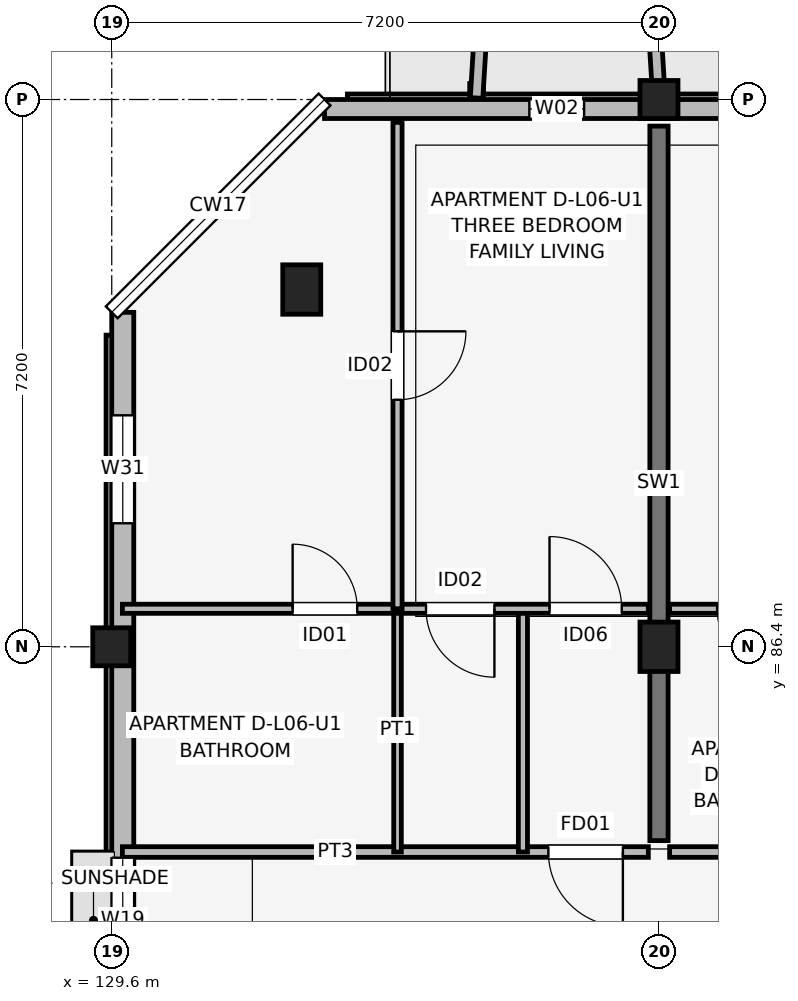
"""IFC4 building model, lengths in metres.
Left out: names, types, materials, properties, quantities, classifications, styles, units other than length and angle.
Written with IfcOpenShell. Run it as: python <this file> out.ifc"""

import sys

from ifc_helpers import new_model, si_unit, direction, frame, frame_2d, origin, origin_2d, place, context, subcontext, project, spatial, rectangle, extrude, element, fill, save


model = new_model("IFC4")
c1 = context("Model", 3, precision=1e-05, world=origin(), true_north=direction((0.0, 1.0)))
c2 = subcontext(c1, "Body", "Model", "MODEL_VIEW")
j1 = project(units=[si_unit("LENGTHUNIT", "METRE"), si_unit("PLANEANGLEUNIT", "RADIAN")], contexts=[c1])
p1 = place(None, origin())
s1 = spatial("IfcSite", under=j1, at=p1, CompositionType="ELEMENT")
p2 = place(p1, origin())
s2 = spatial("IfcBuilding", under=s1, at=p2, CompositionType="ELEMENT")
p3 = place(p2, frame((0.0, 0.0, 21.3)))
s3 = spatial("IfcBuildingStorey", under=s2, at=p3, CompositionType="ELEMENT", Elevation=21.3)
p4 = place(p3, frame((129.6, 86.4, 0.0), z_axis=(0.0, 0.0, 1.0), x_axis=(1.0, 0.0, 0.0)))
e1 = element("IfcColumn", 1, at=p4, inside=s3, PredefinedType="COLUMN", context=c2, shape_type="SweptSolid", body=[
    extrude(rectangle(XDim=0.5, YDim=0.5, at=origin_2d()), origin(), (0.0, 0.0, 1.0), 3.15),
])
for number, where, z_axis, x_axis in (
    (2, (132.1, 91.1, 0.0), (0.0, 0.0, 1.0), (1.0, 0.0, 0.0)),
    (3, (136.8, 86.4, 0.0), (0.0, 0.0, 1.0), (1.0, 0.0, 0.0)),
):
    element("IfcColumn", number, at=place(p3, frame(where, z_axis=z_axis, x_axis=x_axis)), inside=s3, PredefinedType="COLUMN", context=c2, shape_type="SweptSolid", body=[
        extrude(rectangle(XDim=0.5, YDim=0.65, at=origin_2d()), origin(), (0.0, 0.0, 1.0), 3.15),
    ])
p5 = place(p3, frame((136.8, 93.6, 0.0), z_axis=(0.0, 0.0, 1.0), x_axis=(1.0, 0.0, 0.0)))
e4 = element("IfcColumn", 4, at=p5, inside=s3, PredefinedType="COLUMN", context=c2, shape_type="SweptSolid", body=[
    extrude(rectangle(XDim=0.5, YDim=0.5, at=origin_2d()), origin(), (0.0, 0.0, 1.0), 3.15),
])
p6 = place(p3, frame((136.8, 83.85, 0.0), z_axis=(0.0, 0.0, 1.0), x_axis=(0.0, 1.0, 0.0)))
e5 = element("IfcWall", 5, at=p6, inside=s3, PredefinedType="SHEAR", context=c2, shape_type="SweptSolid", body=[
    extrude(rectangle(XDim=9.4, YDim=0.24, at=frame_2d((4.7, 0.0))), origin(), (0.0, 0.0, 1.0), 3.15),
])
p7 = place(p3, frame((162.8, 93.475, 0.0), z_axis=(0.0, 0.0, 1.0), x_axis=(-1.0, 0.0, 0.0)))
e6 = element("IfcWall", 6, at=p7, inside=s3, PredefinedType="SOLIDWALL", context=c2, shape_type="SweptSolid", body=[
    extrude(rectangle(XDim=30.4, YDim=0.25, at=frame_2d((15.2, 0.0))), origin(), (0.0, 0.0, 1.0), 2.43),
])
p8 = place(p7, frame((23.3, 0.0, 0.0), z_axis=(0.0, 0.0, 1.0), x_axis=(-1.0, 0.0, 0.0)))
e7 = element("IfcOpeningElement", 7, at=p8, cuts=e6, PredefinedType="OPENING", context=c2, shape_type="SweptSolid", body=[
    extrude(rectangle(XDim=1.8, YDim=2.15, at=frame_2d((0.9, 1.075))), frame((0.0, 0.135, 0.0), z_axis=(0.0, -1.0, 0.0), x_axis=(1.0, 0.0, 0.0)), (0.0, 0.0, 1.0), 0.27),
])
p9 = place(p7, frame((8.825, 0.0, 0.0), z_axis=(0.0, 0.0, 1.0), x_axis=(-1.0, 0.0, 0.0)))
e8 = element("IfcOpeningElement", 8, at=p9, cuts=e6, PredefinedType="OPENING", context=c2, shape_type="SweptSolid", body=[
    extrude(rectangle(XDim=1.65, YDim=2.15, at=frame_2d((0.825, 1.075))), frame((0.0, 0.135, 0.0), z_axis=(0.0, -1.0, 0.0), x_axis=(1.0, 0.0, 0.0)), (0.0, 0.0, 1.0), 0.27),
])
p10 = place(p7, frame((26.985, 0.0, 0.75)))
e9 = element("IfcOpeningElement", 9, at=p10, cuts=e6, PredefinedType="OPENING", context=c2, shape_type="SweptSolid", body=[
    extrude(rectangle(XDim=0.72, YDim=1.35, at=frame_2d((0.36, 0.675))), frame((0.0, 0.135, 0.0), z_axis=(0.0, -1.0, 0.0), x_axis=(1.0, 0.0, 0.0)), (0.0, 0.0, 1.0), 0.27),
])
p11 = place(p7, frame((17.115, 0.0, 0.75)))
e10 = element("IfcOpeningElement", 10, at=p11, cuts=e6, PredefinedType="OPENING", context=c2, shape_type="SweptSolid", body=[
    extrude(rectangle(XDim=0.85, YDim=1.4, at=frame_2d((0.425, 0.7))), frame((0.0, 0.135, 0.0), z_axis=(0.0, -1.0, 0.0), x_axis=(1.0, 0.0, 0.0)), (0.0, 0.0, 1.0), 0.27),
])
p12 = place(p7, frame((14.125, 0.0, 0.67)))
e11 = element("IfcOpeningElement", 11, at=p12, cuts=e6, PredefinedType="OPENING", context=c2, shape_type="SweptSolid", body=[
    extrude(rectangle(XDim=2.15, YDim=1.65, at=frame_2d((1.075, 0.825))), frame((0.0, 0.135, 0.0), z_axis=(0.0, -1.0, 0.0), x_axis=(1.0, 0.0, 0.0)), (0.0, 0.0, 1.0), 0.27),
])
p13 = place(p7, frame((2.125, 0.0, 0.7)))
e12 = element("IfcOpeningElement", 12, at=p13, cuts=e6, PredefinedType="OPENING", context=c2, shape_type="SweptSolid", body=[
    extrude(rectangle(XDim=1.86, YDim=1.6, at=frame_2d((0.93, 0.8))), frame((0.0, 0.135, 0.0), z_axis=(0.0, -1.0, 0.0), x_axis=(1.0, 0.0, 0.0)), (0.0, 0.0, 1.0), 0.27),
])
p14 = place(p3, frame((129.745, 90.8, 0.0), z_axis=(0.0, 0.0, 1.0), x_axis=(0.0, -1.0, 0.0)))
e13 = element("IfcWall", 13, at=p14, inside=s3, PredefinedType="SOLIDWALL", context=c2, shape_type="SweptSolid", body=[
    extrude(rectangle(XDim=16.0, YDim=0.29, at=frame_2d((8.0, 0.0))), origin(), (0.0, 0.0, 1.0), 2.43),
])
p15 = place(p14, frame((7.175, 0.0, 1.05)))
e14 = element("IfcOpeningElement", 14, at=p15, cuts=e13, PredefinedType="OPENING", context=c2, shape_type="SweptSolid", body=[
    extrude(rectangle(XDim=1.65, YDim=1.15, at=frame_2d((0.825, 0.575))), frame((0.0, 0.155, 0.0), z_axis=(0.0, -1.0, 0.0), x_axis=(1.0, 0.0, 0.0)), (0.0, 0.0, 1.0), 0.31),
])
p16 = place(p14, frame((1.355, 0.0, 0.72)))
e15 = element("IfcOpeningElement", 15, at=p16, cuts=e13, PredefinedType="OPENING", context=c2, shape_type="SweptSolid", body=[
    extrude(rectangle(XDim=1.42, YDim=1.6, at=frame_2d((0.71, 0.8))), frame((0.0, 0.155, 0.0), z_axis=(0.0, -1.0, 0.0), x_axis=(1.0, 0.0, 0.0)), (0.0, 0.0, 1.0), 0.31),
])
for number, where, z_axis, x_axis in (
    (16, (134.4, 93.62, 0.0), (0.0, 0.0, 1.0), (0.061, 0.998, 0.0)),
    (17, (136.8, 93.62, 0.0), (0.0, 0.0, 1.0), (-0.061, 0.998, 0.0)),
):
    element("IfcWall", number, at=place(p3, frame(where, z_axis=z_axis, x_axis=x_axis)), inside=s3, PredefinedType="ELEMENTEDWALL", context=c2, shape_type="SweptSolid", body=[
        extrude(rectangle(XDim=1.964, YDim=0.165, at=frame_2d((0.982, 0.0))), origin(), (0.0, 0.0, 1.0), 2.95),
    ])
p17 = place(p3, frame((129.74, 83.7, 0.0), z_axis=(0.0, 0.0, 1.0), x_axis=(1.0, 0.0, 0.0)))
e18 = element("IfcWall", 18, at=p17, inside=s3, PredefinedType="PARTITIONING", context=c2, shape_type="SweptSolid", body=[
    extrude(rectangle(XDim=6.92, YDim=0.14, at=frame_2d((3.46, 0.0))), origin(), (0.0, 0.0, 1.0), 2.38),
])
p18 = place(p17, frame((6.585, 0.0, 0.0), z_axis=(0.0, 0.0, 1.0), x_axis=(-1.0, 0.0, 0.0)))
e19 = element("IfcOpeningElement", 19, at=p18, cuts=e18, PredefinedType="OPENING", context=c2, shape_type="SweptSolid", body=[
    extrude(rectangle(XDim=0.98, YDim=2.1, at=frame_2d((0.49, 1.05))), frame((0.0, 0.08, 0.0), z_axis=(0.0, -1.0, 0.0), x_axis=(1.0, 0.0, 0.0)), (0.0, 0.0, 1.0), 0.16),
])
p19 = place(p3, frame((133.36, 83.7, 0.0), z_axis=(0.0, 0.0, 1.0), x_axis=(0.0, 1.0, 0.0)))
e20 = element("IfcWall", 20, at=p19, inside=s3, PredefinedType="PARTITIONING", context=c2, shape_type="SweptSolid", body=[
    extrude(rectangle(XDim=3.2, YDim=0.1, at=frame_2d((1.6, 0.0))), origin(), (0.0, 0.0, 1.0), 2.38),
])
p20 = place(p3, frame((135.01, 83.7, 0.0), z_axis=(0.0, 0.0, 1.0), x_axis=(0.0, 1.0, 0.0)))
e21 = element("IfcWall", 21, at=p20, inside=s3, PredefinedType="PARTITIONING", context=c2, shape_type="SweptSolid", body=[
    extrude(rectangle(XDim=3.2, YDim=0.12, at=frame_2d((1.6, 0.0))), origin(), (0.0, 0.0, 1.0), 2.38),
])
p21 = place(p3, frame((129.74, 86.9, 0.0), z_axis=(0.0, 0.0, 1.0), x_axis=(1.0, 0.0, 0.0)))
e22 = element("IfcWall", 22, at=p21, inside=s3, PredefinedType="PARTITIONING", context=c2, shape_type="SweptSolid", body=[
    extrude(rectangle(XDim=6.92, YDim=0.12, at=frame_2d((3.46, 0.0))), origin(), (0.0, 0.0, 1.0), 2.38),
])
p22 = place(p21, frame((2.24, 0.0, 0.0)))
e23 = element("IfcOpeningElement", 23, at=p22, cuts=e22, PredefinedType="OPENING", context=c2, shape_type="SweptSolid", body=[
    extrude(rectangle(XDim=0.85, YDim=2.08, at=frame_2d((0.425, 1.04))), frame((0.0, 0.07, 0.0), z_axis=(0.0, -1.0, 0.0), x_axis=(1.0, 0.0, 0.0)), (0.0, 0.0, 1.0), 0.14),
])
p23 = place(p21, frame((4.895, 0.0, 0.0), z_axis=(0.0, 0.0, 1.0), x_axis=(-1.0, 0.0, 0.0)))
e24 = element("IfcOpeningElement", 24, at=p23, cuts=e22, PredefinedType="OPENING", context=c2, shape_type="SweptSolid", body=[
    extrude(rectangle(XDim=0.9, YDim=2.08, at=frame_2d((0.45, 1.04))), frame((0.0, 0.07, 0.0), z_axis=(0.0, -1.0, 0.0), x_axis=(1.0, 0.0, 0.0)), (0.0, 0.0, 1.0), 0.14),
])
p24 = place(p21, frame((5.62, 0.0, 0.0)))
e25 = element("IfcOpeningElement", 25, at=p24, cuts=e22, PredefinedType="OPENING", context=c2, shape_type="SweptSolid", body=[
    extrude(rectangle(XDim=0.95, YDim=2.08, at=frame_2d((0.475, 1.04))), frame((0.0, 0.07, 0.0), z_axis=(0.0, -1.0, 0.0), x_axis=(1.0, 0.0, 0.0)), (0.0, 0.0, 1.0), 0.14),
])
p25 = place(p3, frame((133.36, 86.9, 0.0), z_axis=(0.0, 0.0, 1.0), x_axis=(0.0, 1.0, 0.0)))
e26 = element("IfcWall", 26, at=p25, inside=s3, PredefinedType="PARTITIONING", context=c2, shape_type="SweptSolid", body=[
    extrude(rectangle(XDim=6.4, YDim=0.12, at=frame_2d((3.2, 0.0))), origin(), (0.0, 0.0, 1.0), 2.38),
])
p26 = place(p25, frame((3.65, 0.0, 0.0), z_axis=(0.0, 0.0, 1.0), x_axis=(-1.0, 0.0, 0.0)))
e27 = element("IfcOpeningElement", 27, at=p26, cuts=e26, PredefinedType="OPENING", context=c2, shape_type="SweptSolid", body=[
    extrude(rectangle(XDim=0.9, YDim=2.08, at=frame_2d((0.45, 1.04))), frame((0.0, 0.07, 0.0), z_axis=(0.0, -1.0, 0.0), x_axis=(1.0, 0.0, 0.0)), (0.0, 0.0, 1.0), 0.14),
])
p27 = place(p3, frame((136.94, 83.7, 0.0), z_axis=(0.0, 0.0, 1.0), x_axis=(1.0, 0.0, 0.0)))
e28 = element("IfcWall", 28, at=p27, inside=s3, PredefinedType="PARTITIONING", context=c2, shape_type="SweptSolid", body=[
    extrude(rectangle(XDim=6.92, YDim=0.14, at=frame_2d((3.46, 0.0))), origin(), (0.0, 0.0, 1.0), 2.38),
])
p28 = place(p27, frame((4.995, 0.0, 0.0)))
e29 = element("IfcOpeningElement", 29, at=p28, cuts=e28, PredefinedType="OPENING", context=c2, shape_type="SweptSolid", body=[
    extrude(rectangle(XDim=0.98, YDim=2.1, at=frame_2d((0.49, 1.05))), frame((0.0, 0.08, 0.0), z_axis=(0.0, -1.0, 0.0), x_axis=(1.0, 0.0, 0.0)), (0.0, 0.0, 1.0), 0.16),
])
p29 = place(p3, frame((136.94, 86.9, 0.0), z_axis=(0.0, 0.0, 1.0), x_axis=(1.0, 0.0, 0.0)))
e30 = element("IfcWall", 30, at=p29, inside=s3, PredefinedType="PARTITIONING", context=c2, shape_type="SweptSolid", body=[
    extrude(rectangle(XDim=6.92, YDim=0.12, at=frame_2d((3.46, 0.0))), origin(), (0.0, 0.0, 1.0), 2.38),
])
p30 = place(p29, frame((1.475, 0.0, 0.0), z_axis=(0.0, 0.0, 1.0), x_axis=(-1.0, 0.0, 0.0)))
e31 = element("IfcOpeningElement", 31, at=p30, cuts=e30, PredefinedType="OPENING", context=c2, shape_type="SweptSolid", body=[
    extrude(rectangle(XDim=0.85, YDim=2.08, at=frame_2d((0.425, 1.04))), frame((0.0, 0.07, 0.0), z_axis=(0.0, -1.0, 0.0), x_axis=(1.0, 0.0, 0.0)), (0.0, 0.0, 1.0), 0.14),
])
p31 = place(p29, frame((2.625, 0.0, 0.0)))
e32 = element("IfcOpeningElement", 32, at=p31, cuts=e30, PredefinedType="OPENING", context=c2, shape_type="SweptSolid", body=[
    extrude(rectangle(XDim=0.9, YDim=2.08, at=frame_2d((0.45, 1.04))), frame((0.0, 0.07, 0.0), z_axis=(0.0, -1.0, 0.0), x_axis=(1.0, 0.0, 0.0)), (0.0, 0.0, 1.0), 0.14),
])
p32 = place(p29, frame((5.96, 0.0, 0.0), z_axis=(0.0, 0.0, 1.0), x_axis=(-1.0, 0.0, 0.0)))
e33 = element("IfcOpeningElement", 33, at=p32, cuts=e30, PredefinedType="OPENING", context=c2, shape_type="SweptSolid", body=[
    extrude(rectangle(XDim=0.95, YDim=2.08, at=frame_2d((0.475, 1.04))), frame((0.0, 0.07, 0.0), z_axis=(0.0, -1.0, 0.0), x_axis=(1.0, 0.0, 0.0)), (0.0, 0.0, 1.0), 0.14),
])
p33 = place(p10, origin())
e34 = element("IfcWindow", 34, at=p33, inside=s3, PartitioningType="SINGLE_PANEL", PredefinedType="WINDOW", context=c2, shape_type="SweptSolid", body=[
    extrude(rectangle(XDim=0.72, YDim=1.35, at=frame_2d((0.36, 0.675))), frame((0.0, 0.03, 0.0), z_axis=(0.0, -1.0, 0.0), x_axis=(1.0, 0.0, 0.0)), (0.0, 0.0, 1.0), 0.06),
])
fill(e9, e34)
p34 = place(p15, origin())
e35 = element("IfcWindow", 35, at=p34, inside=s3, PartitioningType="SINGLE_PANEL", PredefinedType="WINDOW", context=c2, shape_type="SweptSolid", body=[
    extrude(rectangle(XDim=1.65, YDim=1.15, at=frame_2d((0.825, 0.575))), frame((0.0, 0.03, 0.0), z_axis=(0.0, -1.0, 0.0), x_axis=(1.0, 0.0, 0.0)), (0.0, 0.0, 1.0), 0.06),
])
fill(e14, e35)
p35 = place(p16, origin())
e36 = element("IfcWindow", 36, at=p35, inside=s3, PartitioningType="SINGLE_PANEL", PredefinedType="WINDOW", context=c2, shape_type="SweptSolid", body=[
    extrude(rectangle(XDim=1.42, YDim=1.6, at=frame_2d((0.71, 0.8))), frame((0.0, 0.03, 0.0), z_axis=(0.0, -1.0, 0.0), x_axis=(1.0, 0.0, 0.0)), (0.0, 0.0, 1.0), 0.06),
])
fill(e15, e36)
p36 = place(p18, origin())
e37 = element("IfcDoor", 37, at=p36, inside=s3, OperationType="SINGLE_SWING_RIGHT", PredefinedType="DOOR", context=c2, shape_type="SweptSolid", body=[
    extrude(rectangle(XDim=0.98, YDim=2.1, at=frame_2d((0.49, 1.05))), frame((0.0, 0.025, 0.0), z_axis=(0.0, -1.0, 0.0), x_axis=(1.0, 0.0, 0.0)), (0.0, 0.0, 1.0), 0.05),
])
fill(e19, e37)
p37 = place(p22, origin())
e38 = element("IfcDoor", 38, at=p37, inside=s3, OperationType="SINGLE_SWING_LEFT", PredefinedType="DOOR", context=c2, shape_type="SweptSolid", body=[
    extrude(rectangle(XDim=0.85, YDim=2.08, at=frame_2d((0.425, 1.04))), frame((0.0, 0.025, 0.0), z_axis=(0.0, -1.0, 0.0), x_axis=(1.0, 0.0, 0.0)), (0.0, 0.0, 1.0), 0.05),
])
fill(e23, e38)
p38 = place(p23, origin())
e39 = element("IfcDoor", 39, at=p38, inside=s3, OperationType="SINGLE_SWING_RIGHT", PredefinedType="DOOR", context=c2, shape_type="SweptSolid", body=[
    extrude(rectangle(XDim=0.9, YDim=2.08, at=frame_2d((0.45, 1.04))), frame((0.0, 0.025, 0.0), z_axis=(0.0, -1.0, 0.0), x_axis=(1.0, 0.0, 0.0)), (0.0, 0.0, 1.0), 0.05),
])
fill(e24, e39)
p39 = place(p24, origin())
e40 = element("IfcDoor", 40, at=p39, inside=s3, OperationType="SINGLE_SWING_LEFT", PredefinedType="DOOR", context=c2, shape_type="SweptSolid", body=[
    extrude(rectangle(XDim=0.95, YDim=2.08, at=frame_2d((0.475, 1.04))), frame((0.0, 0.025, 0.0), z_axis=(0.0, -1.0, 0.0), x_axis=(1.0, 0.0, 0.0)), (0.0, 0.0, 1.0), 0.05),
])
fill(e25, e40)
p40 = place(p26, origin())
e41 = element("IfcDoor", 41, at=p40, inside=s3, OperationType="SINGLE_SWING_RIGHT", PredefinedType="DOOR", context=c2, shape_type="SweptSolid", body=[
    extrude(rectangle(XDim=0.9, YDim=2.08, at=frame_2d((0.45, 1.04))), frame((0.0, 0.025, 0.0), z_axis=(0.0, -1.0, 0.0), x_axis=(1.0, 0.0, 0.0)), (0.0, 0.0, 1.0), 0.05),
])
fill(e27, e41)
p41 = place(p30, origin())
e42 = element("IfcDoor", 42, at=p41, inside=s3, OperationType="SINGLE_SWING_RIGHT", PredefinedType="DOOR", context=c2, shape_type="SweptSolid", body=[
    extrude(rectangle(XDim=0.85, YDim=2.08, at=frame_2d((0.425, 1.04))), frame((0.0, 0.025, 0.0), z_axis=(0.0, -1.0, 0.0), x_axis=(1.0, 0.0, 0.0)), (0.0, 0.0, 1.0), 0.05),
])
fill(e31, e42)
save(model, sys.argv[1])
